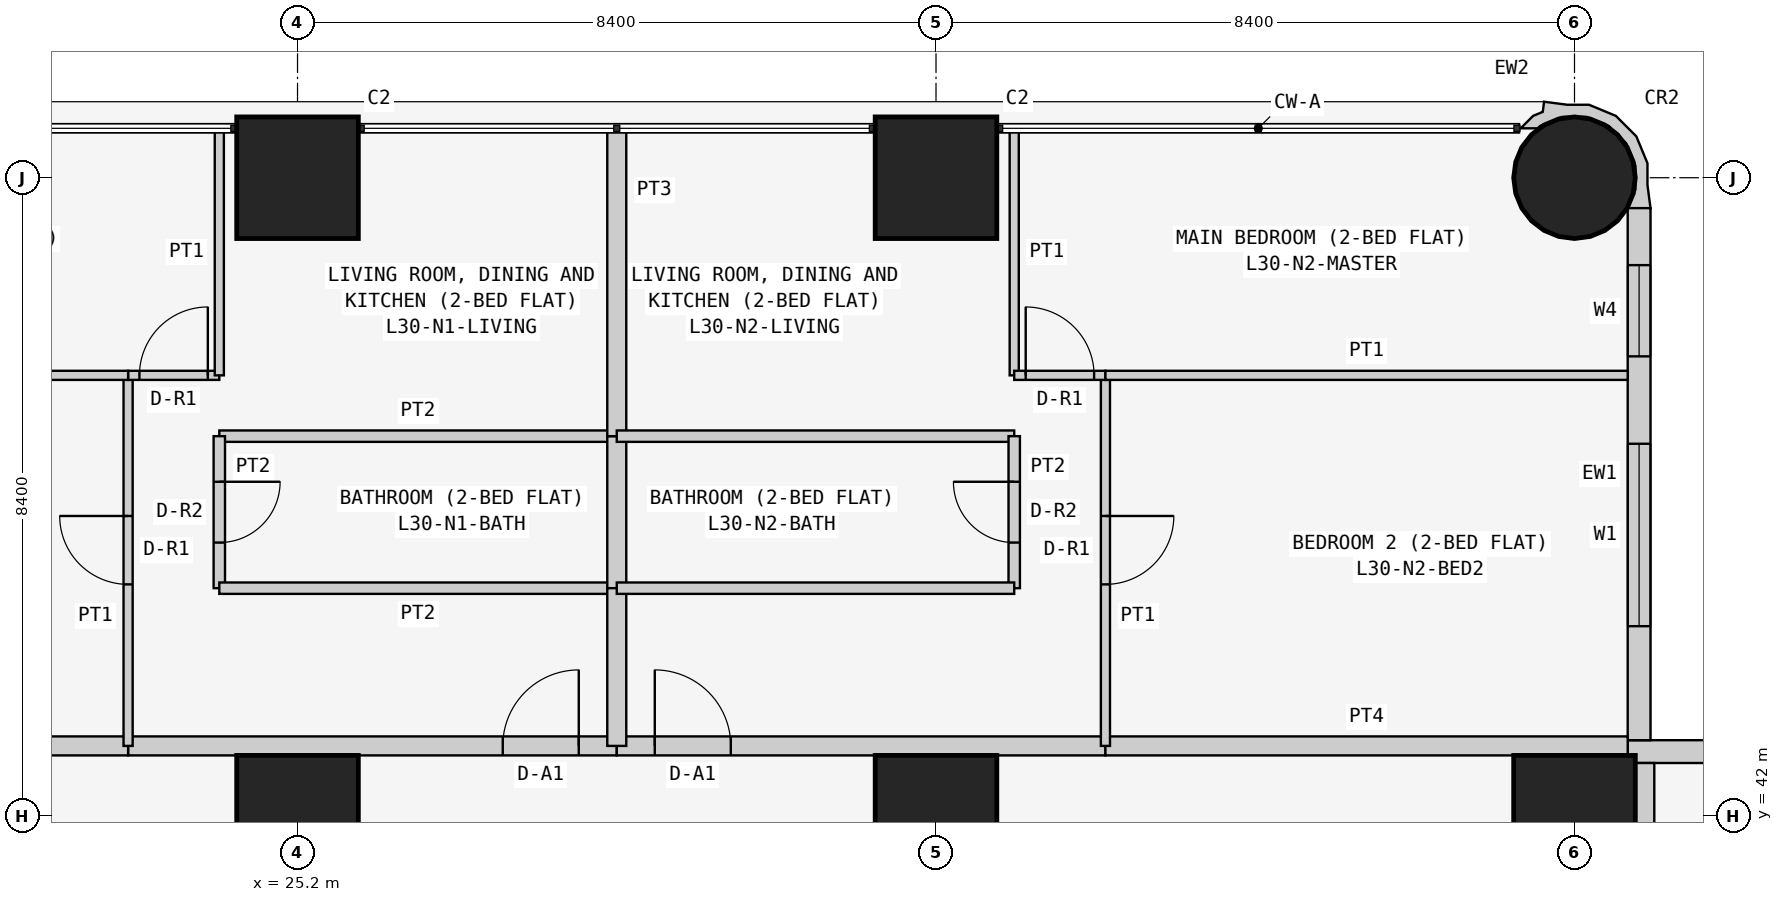
"""IFC4 building model, lengths in metres.
Left out: names, types, materials, properties, quantities, classifications, styles, units other than length and angle.
Written with IfcOpenShell. Run it as: python <this file> out.ifc"""

import sys

from ifc_helpers import new_model, si_unit, direction, frame, frame_2d, origin, origin_2d, place, context, subcontext, project, spatial, polyline, rectangle, circle, outline, extrude, element, fill, save


model = new_model("IFC4")
c1 = context("Model", 3, precision=1e-05, world=origin(), true_north=direction((0.0, 1.0)))
c2 = subcontext(c1, "Body", "Model", "MODEL_VIEW")
j1 = project(units=[si_unit("LENGTHUNIT", "METRE"), si_unit("PLANEANGLEUNIT", "RADIAN")], contexts=[c1])
p1 = place(None, origin())
s1 = spatial("IfcSite", under=j1, at=p1, CompositionType="ELEMENT")
p2 = place(p1, origin())
s2 = spatial("IfcBuilding", under=s1, at=p2, CompositionType="ELEMENT")
p3 = place(p2, frame((0.0, 0.0, 119.7)))
s3 = spatial("IfcBuildingStorey", under=s2, at=p3, CompositionType="ELEMENT", Elevation=119.7)
for number, where, z_axis, x_axis in (
    (1, (25.2, 42.0, 0.0), (0.0, 0.0, 1.0), (1.0, 0.0, 0.0)),
    (2, (25.2, 50.4, 0.0), (0.0, 0.0, 1.0), (1.0, 0.0, 0.0)),
    (3, (33.6, 42.0, 0.0), (0.0, 0.0, 1.0), (1.0, 0.0, 0.0)),
    (4, (33.6, 50.4, 0.0), (0.0, 0.0, 1.0), (1.0, 0.0, 0.0)),
    (5, (42.0, 42.0, 0.0), (0.0, 0.0, 1.0), (1.0, 0.0, 0.0)),
):
    element("IfcColumn", number, at=place(p3, frame(where, z_axis=z_axis, x_axis=x_axis)), inside=s3, PredefinedType="COLUMN", context=c2, shape_type="SweptSolid", body=[
        extrude(rectangle(XDim=1.6, YDim=1.6, at=origin_2d()), origin(), (0.0, 0.0, 1.0), 3.6),
    ])
p4 = place(p3, frame((42.0, 50.4, 0.0), z_axis=(0.0, 0.0, 1.0), x_axis=(1.0, 0.0, 0.0)))
e6 = element("IfcColumn", 6, at=p4, inside=s3, PredefinedType="COLUMN", context=c2, shape_type="SweptSolid", body=[
    extrude(circle(Radius=0.8, at=origin_2d()), origin(), (0.0, 0.0, 1.0), 3.6),
])
p5 = place(p3, frame((58.4, 42.85, 0.0), z_axis=(0.0, 0.0, 1.0), x_axis=(-1.0, 0.0, 0.0)))
e7 = element("IfcWall", 7, at=p5, inside=s3, PredefinedType="SOLIDWALL", context=c2, shape_type="SweptSolid", body=[
    extrude(rectangle(XDim=15.7, YDim=0.3, at=frame_2d((7.85, 0.0))), origin(), (0.0, 0.0, 1.0), 3.45),
])
p6 = place(p5, frame((12.4, 0.0, 0.9)))
e8 = element("IfcOpeningElement", 8, at=p6, cuts=e7, PredefinedType="OPENING", context=c2, shape_type="SweptSolid", body=[
    extrude(rectangle(XDim=1.8, YDim=1.5, at=frame_2d((0.9, 0.75))), frame((0.0, 0.16, 0.0), z_axis=(0.0, -1.0, 0.0), x_axis=(1.0, 0.0, 0.0)), (0.0, 0.0, 1.0), 0.32),
])
p7 = place(p5, frame((9.55, 0.0, 1.5)))
e9 = element("IfcOpeningElement", 9, at=p7, cuts=e7, PredefinedType="OPENING", context=c2, shape_type="SweptSolid", body=[
    extrude(rectangle(XDim=0.9, YDim=0.7, at=frame_2d((0.45, 0.35))), frame((0.0, 0.16, 0.0), z_axis=(0.0, -1.0, 0.0), x_axis=(1.0, 0.0, 0.0)), (0.0, 0.0, 1.0), 0.32),
])
p8 = place(p5, frame((5.1, 0.0, 0.9)))
e10 = element("IfcOpeningElement", 10, at=p8, cuts=e7, PredefinedType="OPENING", context=c2, shape_type="SweptSolid", body=[
    extrude(rectangle(XDim=1.8, YDim=1.5, at=frame_2d((0.9, 0.75))), frame((0.0, 0.16, 0.0), z_axis=(0.0, -1.0, 0.0), x_axis=(1.0, 0.0, 0.0)), (0.0, 0.0, 1.0), 0.32),
])
p9 = place(p5, frame((2.0, 0.0, 0.0)))
e11 = element("IfcOpeningElement", 11, at=p9, cuts=e7, PredefinedType="OPENING", context=c2, shape_type="SweptSolid", body=[
    extrude(rectangle(XDim=0.9, YDim=2.4, at=frame_2d((0.45, 1.2))), frame((0.0, 0.16, 0.0), z_axis=(0.0, -1.0, 0.0), x_axis=(1.0, 0.0, 0.0)), (0.0, 0.0, 1.0), 0.32),
])
p10 = place(p5, frame((0.7, 0.0, 0.9)))
e12 = element("IfcOpeningElement", 12, at=p10, cuts=e7, PredefinedType="OPENING", context=c2, shape_type="SweptSolid", body=[
    extrude(rectangle(XDim=1.2, YDim=1.5, at=frame_2d((0.6, 0.75))), frame((0.0, 0.16, 0.0), z_axis=(0.0, -1.0, 0.0), x_axis=(1.0, 0.0, 0.0)), (0.0, 0.0, 1.0), 0.32),
])
p11 = place(p3, frame((42.85, 43.0, 0.0), z_axis=(0.0, 0.0, 1.0), x_axis=(0.0, 1.0, 0.0)))
e13 = element("IfcWall", 13, at=p11, inside=s3, PredefinedType="SOLIDWALL", context=c2, shape_type="SweptSolid", body=[
    extrude(rectangle(XDim=7.0, YDim=0.3, at=frame_2d((3.5, 0.0))), origin(), (0.0, 0.0, 1.0), 3.45),
])
p12 = place(p11, frame((1.5, 0.0, 0.9)))
e14 = element("IfcOpeningElement", 14, at=p12, cuts=e13, PredefinedType="OPENING", context=c2, shape_type="SweptSolid", body=[
    extrude(rectangle(XDim=2.4, YDim=1.5, at=frame_2d((1.2, 0.75))), frame((0.0, 0.16, 0.0), z_axis=(0.0, -1.0, 0.0), x_axis=(1.0, 0.0, 0.0)), (0.0, 0.0, 1.0), 0.32),
])
p13 = place(p11, frame((5.05, 0.0, 0.9)))
e15 = element("IfcOpeningElement", 15, at=p13, cuts=e13, PredefinedType="OPENING", context=c2, shape_type="SweptSolid", body=[
    extrude(rectangle(XDim=1.2, YDim=1.5, at=frame_2d((0.6, 0.75))), frame((0.0, 0.16, 0.0), z_axis=(0.0, -1.0, 0.0), x_axis=(1.0, 0.0, 0.0)), (0.0, 0.0, 1.0), 0.32),
])
p14 = place(p3, frame((42.817, 50.073, 0.0), z_axis=(0.0, 0.0, 1.0), x_axis=(0.343276641956, 0.93923434088, 0.0)))
e16 = element("IfcWall", 16, at=p14, inside=s3, PredefinedType="SOLIDWALL", context=c2, shape_type="SweptSolid", body=[
    extrude(outline(polyline([(0.266, -0.055), (0.535, 0.044), (0.817, 0.302), (0.978, 0.648), (0.994, 1.03), (0.895, 1.3), (0.828, 1.598), (0.697, 1.569), (0.604, 1.67), (0.394, 1.767), (0.471, 1.556), (0.509, 1.539), (0.724, 1.304), (0.833, 1.005), (0.82, 0.687), (0.686, 0.397), (0.451, 0.182), (0.152, 0.073), (-0.116, 0.084), (-0.128, 0.078), (-0.146, 0.071), (-0.006, -0.197), (0.266, -0.055)])), origin(), (0.0, 0.0, 1.0), 3.45),
])
p15 = place(p3, frame((22.971, 42.925, 0.0), z_axis=(0.0, 0.0, 1.0), x_axis=(1.0, 0.0, 0.0)))
e17 = element("IfcWall", 17, at=p15, inside=s3, PredefinedType="PARTITIONING", context=c2, shape_type="SweptSolid", body=[
    extrude(rectangle(XDim=6.429, YDim=0.25, at=frame_2d((3.214, 0.0))), origin(), (0.0, 0.0, 1.0), 3.45),
])
p16 = place(p15, frame((4.929, 0.0, 0.0)))
e18 = element("IfcOpeningElement", 18, at=p16, cuts=e17, PredefinedType="OPENING", context=c2, shape_type="SweptSolid", body=[
    extrude(rectangle(XDim=1.0, YDim=2.1, at=frame_2d((0.5, 1.05))), frame((0.0, 0.135, 0.0), z_axis=(0.0, -1.0, 0.0), x_axis=(1.0, 0.0, 0.0)), (0.0, 0.0, 1.0), 0.27),
])
p17 = place(p3, frame((16.1, 42.925, 0.0), z_axis=(0.0, 0.0, 1.0), x_axis=(1.0, 0.0, 0.0)))
e19 = element("IfcWall", 19, at=p17, inside=s3, PredefinedType="PARTITIONING", context=c2, shape_type="SweptSolid", body=[
    extrude(rectangle(XDim=6.871, YDim=0.25, at=frame_2d((3.436, 0.0))), origin(), (0.0, 0.0, 1.0), 3.45),
])
p18 = place(p3, frame((29.4, 42.925, 0.0), z_axis=(0.0, 0.0, 1.0), x_axis=(1.0, 0.0, 0.0)))
e20 = element("IfcWall", 20, at=p18, inside=s3, PredefinedType="PARTITIONING", context=c2, shape_type="SweptSolid", body=[
    extrude(rectangle(XDim=6.429, YDim=0.25, at=frame_2d((3.215, 0.0))), origin(), (0.0, 0.0, 1.0), 3.45),
])
p19 = place(p18, frame((0.5, 0.0, 0.0)))
e21 = element("IfcOpeningElement", 21, at=p19, cuts=e20, PredefinedType="OPENING", context=c2, shape_type="SweptSolid", body=[
    extrude(rectangle(XDim=1.0, YDim=2.1, at=frame_2d((0.5, 1.05))), frame((0.0, 0.135, 0.0), z_axis=(0.0, -1.0, 0.0), x_axis=(1.0, 0.0, 0.0)), (0.0, 0.0, 1.0), 0.27),
])
for number, where, z_axis, x_axis in (
    (22, (35.829, 42.925, 0.0), (0.0, 0.0, 1.0), (1.0, 0.0, 0.0)),
    (23, (42.925, 42.7, 0.0), (0.0, 0.0, 1.0), (0.0, -1.0, 0.0)),
):
    element("IfcWall", number, at=place(p3, frame(where, z_axis=z_axis, x_axis=x_axis)), inside=s3, PredefinedType="PARTITIONING", context=c2, shape_type="SweptSolid", body=[
        extrude(rectangle(XDim=6.871, YDim=0.25, at=frame_2d((3.436, 0.0))), origin(), (0.0, 0.0, 1.0), 3.45),
    ])
p20 = place(p3, frame((29.4, 47.0, 0.0), z_axis=(0.0, 0.0, 1.0), x_axis=(-1.0, 0.0, 0.0)))
e24 = element("IfcWall", 24, at=p20, inside=s3, PredefinedType="PARTITIONING", context=c2, shape_type="SweptSolid", body=[
    extrude(rectangle(XDim=5.229, YDim=0.15, at=frame_2d((2.615, 0.0))), origin(), (0.0, 0.0, 1.0), 3.45),
])
p21 = place(p3, frame((24.171, 47.0, 0.0), z_axis=(0.0, 0.0, 1.0), x_axis=(0.0, -1.0, 0.0)))
e25 = element("IfcWall", 25, at=p21, inside=s3, PredefinedType="PARTITIONING", context=c2, shape_type="SweptSolid", body=[
    extrude(rectangle(XDim=2.0, YDim=0.15, at=frame_2d((1.0, 0.0))), origin(), (0.0, 0.0, 1.0), 3.45),
])
p22 = place(p21, frame((0.6, 0.0, 0.0)))
e26 = element("IfcOpeningElement", 26, at=p22, cuts=e25, PredefinedType="OPENING", context=c2, shape_type="SweptSolid", body=[
    extrude(rectangle(XDim=0.8, YDim=2.1, at=frame_2d((0.4, 1.05))), frame((0.0, 0.085, 0.0), z_axis=(0.0, -1.0, 0.0), x_axis=(1.0, 0.0, 0.0)), (0.0, 0.0, 1.0), 0.17),
])
p23 = place(p3, frame((24.171, 45.0, 0.0), z_axis=(0.0, 0.0, 1.0), x_axis=(1.0, 0.0, 0.0)))
e27 = element("IfcWall", 27, at=p23, inside=s3, PredefinedType="PARTITIONING", context=c2, shape_type="SweptSolid", body=[
    extrude(rectangle(XDim=5.229, YDim=0.15, at=frame_2d((2.615, 0.0))), origin(), (0.0, 0.0, 1.0), 3.45),
])
p24 = place(p3, frame((29.4, 45.0, 0.0), z_axis=(0.0, 0.0, 1.0), x_axis=(0.0, 1.0, 0.0)))
e28 = element("IfcWall", 28, at=p24, inside=s3, PredefinedType="PARTITIONING", context=c2, shape_type="SweptSolid", body=[
    extrude(rectangle(XDim=2.0, YDim=0.25, at=frame_2d((1.0, 0.0))), origin(), (0.0, 0.0, 1.0), 2.848),
])
p25 = place(p3, frame((22.971, 42.925, 0.0), z_axis=(0.0, 0.0, 1.0), x_axis=(0.0, 1.0, 0.0)))
e29 = element("IfcWall", 29, at=p25, inside=s3, PredefinedType="PARTITIONING", context=c2, shape_type="SweptSolid", body=[
    extrude(rectangle(XDim=4.875, YDim=0.12, at=frame_2d((2.438, 0.0))), origin(), (0.0, 0.0, 1.0), 3.45),
])
p26 = place(p25, frame((2.125, 0.0, 0.0)))
e30 = element("IfcOpeningElement", 30, at=p26, cuts=e29, PredefinedType="OPENING", context=c2, shape_type="SweptSolid", body=[
    extrude(rectangle(XDim=0.9, YDim=2.1, at=frame_2d((0.45, 1.05))), frame((0.0, 0.07, 0.0), z_axis=(0.0, -1.0, 0.0), x_axis=(1.0, 0.0, 0.0)), (0.0, 0.0, 1.0), 0.14),
])
p27 = place(p3, frame((22.971, 47.8, 0.0), z_axis=(0.0, 0.0, 1.0), x_axis=(1.0, 0.0, 0.0)))
e31 = element("IfcWall", 31, at=p27, inside=s3, PredefinedType="PARTITIONING", context=c2, shape_type="SweptSolid", body=[
    extrude(rectangle(XDim=1.2, YDim=0.12, at=frame_2d((0.6, 0.0))), origin(), (0.0, 0.0, 1.0), 3.45),
])
p28 = place(p27, frame((0.149, 0.0, 0.0)))
e32 = element("IfcOpeningElement", 32, at=p28, cuts=e31, PredefinedType="OPENING", context=c2, shape_type="SweptSolid", body=[
    extrude(rectangle(XDim=0.9, YDim=2.1, at=frame_2d((0.45, 1.05))), frame((0.0, 0.07, 0.0), z_axis=(0.0, -1.0, 0.0), x_axis=(1.0, 0.0, 0.0)), (0.0, 0.0, 1.0), 0.14),
])
p29 = place(p3, frame((24.171, 47.8, 0.0), z_axis=(0.0, 0.0, 1.0), x_axis=(0.0, 1.0, 0.0)))
e33 = element("IfcWall", 33, at=p29, inside=s3, PredefinedType="PARTITIONING", context=c2, shape_type="SweptSolid", body=[
    extrude(rectangle(XDim=3.25, YDim=0.12, at=frame_2d((1.625, 0.0))), origin(), (0.0, 0.0, 1.0), 3.45),
])
p30 = place(p3, frame((29.4, 45.0, 0.0), z_axis=(0.0, 0.0, 1.0), x_axis=(0.0, -1.0, 0.0)))
e34 = element("IfcWall", 34, at=p30, inside=s3, PredefinedType="PARTITIONING", context=c2, shape_type="SweptSolid", body=[
    extrude(rectangle(XDim=2.075, YDim=0.25, at=frame_2d((1.038, 0.0))), origin(), (0.0, 0.0, 1.0), 2.848),
])
p31 = place(p3, frame((29.4, 51.05, 0.0), z_axis=(0.0, 0.0, 1.0), x_axis=(0.0, -1.0, 0.0)))
e35 = element("IfcWall", 35, at=p31, inside=s3, PredefinedType="PARTITIONING", context=c2, shape_type="SweptSolid", body=[
    extrude(rectangle(XDim=4.05, YDim=0.25, at=frame_2d((2.025, 0.0))), origin(), (0.0, 0.0, 1.0), 2.848),
])
p32 = place(p3, frame((22.971, 47.8, 0.0), z_axis=(0.0, 0.0, 1.0), x_axis=(-1.0, 0.0, 0.0)))
e36 = element("IfcWall", 36, at=p32, inside=s3, PredefinedType="PARTITIONING", context=c2, shape_type="SweptSolid", body=[
    extrude(rectangle(XDim=6.871, YDim=0.12, at=frame_2d((3.436, 0.0))), origin(), (0.0, 0.0, 1.0), 3.45),
])
p33 = place(p3, frame((29.4, 47.0, 0.0), z_axis=(0.0, 0.0, 1.0), x_axis=(1.0, 0.0, 0.0)))
e37 = element("IfcWall", 37, at=p33, inside=s3, PredefinedType="PARTITIONING", context=c2, shape_type="SweptSolid", body=[
    extrude(rectangle(XDim=5.229, YDim=0.15, at=frame_2d((2.615, 0.0))), origin(), (0.0, 0.0, 1.0), 3.45),
])
p34 = place(p3, frame((34.629, 47.0, 0.0), z_axis=(0.0, 0.0, 1.0), x_axis=(0.0, -1.0, 0.0)))
e38 = element("IfcWall", 38, at=p34, inside=s3, PredefinedType="PARTITIONING", context=c2, shape_type="SweptSolid", body=[
    extrude(rectangle(XDim=2.0, YDim=0.15, at=frame_2d((1.0, 0.0))), origin(), (0.0, 0.0, 1.0), 3.45),
])
p35 = place(p34, frame((0.6, 0.0, 0.0)))
e39 = element("IfcOpeningElement", 39, at=p35, cuts=e38, PredefinedType="OPENING", context=c2, shape_type="SweptSolid", body=[
    extrude(rectangle(XDim=0.8, YDim=2.1, at=frame_2d((0.4, 1.05))), frame((0.0, 0.085, 0.0), z_axis=(0.0, -1.0, 0.0), x_axis=(1.0, 0.0, 0.0)), (0.0, 0.0, 1.0), 0.17),
])
p36 = place(p3, frame((34.629, 45.0, 0.0), z_axis=(0.0, 0.0, 1.0), x_axis=(-1.0, 0.0, 0.0)))
e40 = element("IfcWall", 40, at=p36, inside=s3, PredefinedType="PARTITIONING", context=c2, shape_type="SweptSolid", body=[
    extrude(rectangle(XDim=5.229, YDim=0.15, at=frame_2d((2.615, 0.0))), origin(), (0.0, 0.0, 1.0), 3.45),
])
p37 = place(p3, frame((35.829, 47.8, 0.0), z_axis=(0.0, 0.0, 1.0), x_axis=(0.0, -1.0, 0.0)))
e41 = element("IfcWall", 41, at=p37, inside=s3, PredefinedType="PARTITIONING", context=c2, shape_type="SweptSolid", body=[
    extrude(rectangle(XDim=4.875, YDim=0.12, at=frame_2d((2.438, 0.0))), origin(), (0.0, 0.0, 1.0), 3.45),
])
p38 = place(p37, frame((1.85, 0.0, 0.0)))
e42 = element("IfcOpeningElement", 42, at=p38, cuts=e41, PredefinedType="OPENING", context=c2, shape_type="SweptSolid", body=[
    extrude(rectangle(XDim=0.9, YDim=2.1, at=frame_2d((0.45, 1.05))), frame((0.0, 0.07, 0.0), z_axis=(0.0, -1.0, 0.0), x_axis=(1.0, 0.0, 0.0)), (0.0, 0.0, 1.0), 0.14),
])
p39 = place(p3, frame((34.629, 51.05, 0.0), z_axis=(0.0, 0.0, 1.0), x_axis=(0.0, -1.0, 0.0)))
e43 = element("IfcWall", 43, at=p39, inside=s3, PredefinedType="PARTITIONING", context=c2, shape_type="SweptSolid", body=[
    extrude(rectangle(XDim=3.25, YDim=0.12, at=frame_2d((1.625, 0.0))), origin(), (0.0, 0.0, 1.0), 3.45),
])
p40 = place(p3, frame((34.629, 47.8, 0.0), z_axis=(0.0, 0.0, 1.0), x_axis=(1.0, 0.0, 0.0)))
e44 = element("IfcWall", 44, at=p40, inside=s3, PredefinedType="PARTITIONING", context=c2, shape_type="SweptSolid", body=[
    extrude(rectangle(XDim=1.2, YDim=0.12, at=frame_2d((0.6, 0.0))), origin(), (0.0, 0.0, 1.0), 3.45),
])
p41 = place(p40, frame((0.151, 0.0, 0.0)))
e45 = element("IfcOpeningElement", 45, at=p41, cuts=e44, PredefinedType="OPENING", context=c2, shape_type="SweptSolid", body=[
    extrude(rectangle(XDim=0.9, YDim=2.1, at=frame_2d((0.45, 1.05))), frame((0.0, 0.07, 0.0), z_axis=(0.0, -1.0, 0.0), x_axis=(1.0, 0.0, 0.0)), (0.0, 0.0, 1.0), 0.14),
])
p42 = place(p3, frame((35.829, 47.8, 0.0), z_axis=(0.0, 0.0, 1.0), x_axis=(1.0, 0.0, 0.0)))
e46 = element("IfcWall", 46, at=p42, inside=s3, PredefinedType="PARTITIONING", context=c2, shape_type="SweptSolid", body=[
    extrude(rectangle(XDim=6.871, YDim=0.12, at=frame_2d((3.436, 0.0))), origin(), (0.0, 0.0, 1.0), 3.45),
])
p43 = place(p12, origin())
e47 = element("IfcWindow", 47, at=p43, inside=s3, PartitioningType="SINGLE_PANEL", PredefinedType="WINDOW", context=c2, shape_type="SweptSolid", body=[
    extrude(rectangle(XDim=2.4, YDim=1.5, at=frame_2d((1.2, 0.75))), frame((0.0, 0.03, 0.0), z_axis=(0.0, -1.0, 0.0), x_axis=(1.0, 0.0, 0.0)), (0.0, 0.0, 1.0), 0.06),
])
fill(e14, e47)
p44 = place(p13, origin())
e48 = element("IfcWindow", 48, at=p44, inside=s3, PartitioningType="SINGLE_PANEL", PredefinedType="WINDOW", context=c2, shape_type="SweptSolid", body=[
    extrude(rectangle(XDim=1.2, YDim=1.5, at=frame_2d((0.6, 0.75))), frame((0.0, 0.03, 0.0), z_axis=(0.0, -1.0, 0.0), x_axis=(1.0, 0.0, 0.0)), (0.0, 0.0, 1.0), 0.06),
])
fill(e15, e48)
p45 = place(p16, origin())
e49 = element("IfcDoor", 49, at=p45, inside=s3, OperationType="SINGLE_SWING_RIGHT", PredefinedType="DOOR", context=c2, shape_type="SweptSolid", body=[
    extrude(rectangle(XDim=1.0, YDim=2.1, at=frame_2d((0.5, 1.05))), frame((0.0, 0.025, 0.0), z_axis=(0.0, -1.0, 0.0), x_axis=(1.0, 0.0, 0.0)), (0.0, 0.0, 1.0), 0.05),
])
fill(e18, e49)
p46 = place(p22, origin())
e50 = element("IfcDoor", 50, at=p46, inside=s3, OperationType="SINGLE_SWING_LEFT", PredefinedType="DOOR", context=c2, shape_type="SweptSolid", body=[
    extrude(rectangle(XDim=0.8, YDim=2.1, at=frame_2d((0.4, 1.05))), frame((0.0, 0.025, 0.0), z_axis=(0.0, -1.0, 0.0), x_axis=(1.0, 0.0, 0.0)), (0.0, 0.0, 1.0), 0.05),
])
fill(e26, e50)
p47 = place(p26, origin())
e51 = element("IfcDoor", 51, at=p47, inside=s3, OperationType="SINGLE_SWING_RIGHT", PredefinedType="DOOR", context=c2, shape_type="SweptSolid", body=[
    extrude(rectangle(XDim=0.9, YDim=2.1, at=frame_2d((0.45, 1.05))), frame((0.0, 0.025, 0.0), z_axis=(0.0, -1.0, 0.0), x_axis=(1.0, 0.0, 0.0)), (0.0, 0.0, 1.0), 0.05),
])
fill(e30, e51)
p48 = place(p28, origin())
e52 = element("IfcDoor", 52, at=p48, inside=s3, OperationType="SINGLE_SWING_RIGHT", PredefinedType="DOOR", context=c2, shape_type="SweptSolid", body=[
    extrude(rectangle(XDim=0.9, YDim=2.1, at=frame_2d((0.45, 1.05))), frame((0.0, 0.025, 0.0), z_axis=(0.0, -1.0, 0.0), x_axis=(1.0, 0.0, 0.0)), (0.0, 0.0, 1.0), 0.05),
])
fill(e32, e52)
p49 = place(p19, origin())
e53 = element("IfcDoor", 53, at=p49, inside=s3, OperationType="SINGLE_SWING_LEFT", PredefinedType="DOOR", context=c2, shape_type="SweptSolid", body=[
    extrude(rectangle(XDim=1.0, YDim=2.1, at=frame_2d((0.5, 1.05))), frame((0.0, 0.025, 0.0), z_axis=(0.0, -1.0, 0.0), x_axis=(1.0, 0.0, 0.0)), (0.0, 0.0, 1.0), 0.05),
])
fill(e21, e53)
p50 = place(p35, frame((0.8, 0.0, 0.0), z_axis=(0.0, 0.0, 1.0), x_axis=(-1.0, 0.0, 0.0)))
e54 = element("IfcDoor", 54, at=p50, inside=s3, OperationType="SINGLE_SWING_RIGHT", PredefinedType="DOOR", context=c2, shape_type="SweptSolid", body=[
    extrude(rectangle(XDim=0.8, YDim=2.1, at=frame_2d((0.4, 1.05))), frame((0.0, 0.025, 0.0), z_axis=(0.0, -1.0, 0.0), x_axis=(1.0, 0.0, 0.0)), (0.0, 0.0, 1.0), 0.05),
])
fill(e39, e54)
p51 = place(p38, origin())
e55 = element("IfcDoor", 55, at=p51, inside=s3, OperationType="SINGLE_SWING_LEFT", PredefinedType="DOOR", context=c2, shape_type="SweptSolid", body=[
    extrude(rectangle(XDim=0.9, YDim=2.1, at=frame_2d((0.45, 1.05))), frame((0.0, 0.025, 0.0), z_axis=(0.0, -1.0, 0.0), x_axis=(1.0, 0.0, 0.0)), (0.0, 0.0, 1.0), 0.05),
])
fill(e42, e55)
p52 = place(p41, origin())
e56 = element("IfcDoor", 56, at=p52, inside=s3, OperationType="SINGLE_SWING_LEFT", PredefinedType="DOOR", context=c2, shape_type="SweptSolid", body=[
    extrude(rectangle(XDim=0.9, YDim=2.1, at=frame_2d((0.45, 1.05))), frame((0.0, 0.025, 0.0), z_axis=(0.0, -1.0, 0.0), x_axis=(1.0, 0.0, 0.0)), (0.0, 0.0, 1.0), 0.05),
])
fill(e45, e56)
save(model, sys.argv[1])
